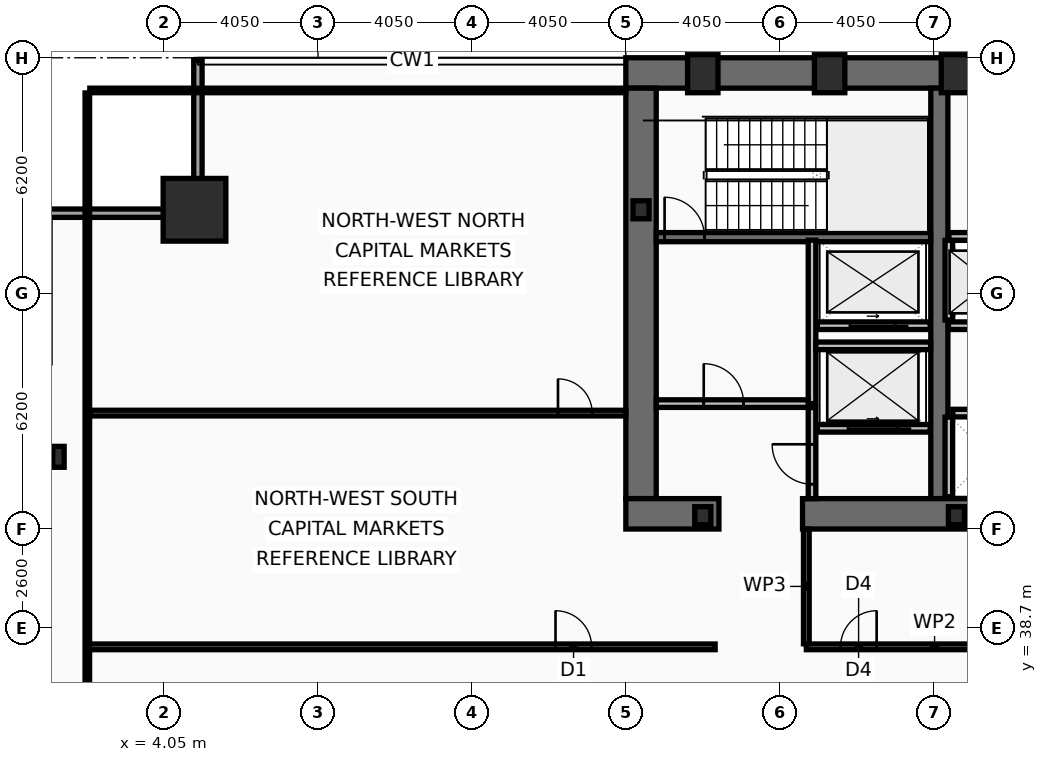
"""IFC4 building model, lengths in metres.
Left out: names, types, materials, properties, quantities, classifications, styles, units other than length and angle.
Written with IfcOpenShell. Run it as: python <this file> out.ifc"""

import sys

from ifc_helpers import new_model, si_unit, direction, frame, frame_2d, origin, origin_2d, place, context, subcontext, project, spatial, rectangle, hollow_rectangle, i_section, extrude, element, fill, save


model = new_model("IFC4")
c1 = context("Model", 3, precision=1e-05, world=origin(), true_north=direction((0.0, 1.0)))
c2 = subcontext(c1, "Body", "Model", "MODEL_VIEW")
j1 = project(units=[si_unit("LENGTHUNIT", "METRE"), si_unit("PLANEANGLEUNIT", "RADIAN")], contexts=[c1])
p1 = place(None, origin())
s1 = spatial("IfcSite", under=j1, at=p1, CompositionType="ELEMENT")
p2 = place(p1, origin())
s2 = spatial("IfcBuilding", under=s1, at=p2, CompositionType="ELEMENT")
p3 = place(p2, frame((0.0, 0.0, 57.8)))
s3 = spatial("IfcBuildingStorey", under=s2, at=p3, CompositionType="ELEMENT", Elevation=57.8)
p4 = place(p3, frame((16.2, 53.3, 0.0), z_axis=(0.0, 0.0, 1.0), x_axis=(1.0, 0.0, 0.0)))
e1 = element("IfcWall", 1, at=p4, inside=s3, PredefinedType="SHEAR", context=c2, shape_type="SweptSolid", body=[
    extrude(rectangle(XDim=40.5, YDim=0.8, at=frame_2d((20.25, 0.0))), origin(), (0.0, 0.0, 1.0), 3.82),
])
p5 = place(p3, frame((16.6, 42.1, 0.0), z_axis=(0.0, 0.0, 1.0), x_axis=(0.0, 1.0, 0.0)))
e2 = element("IfcWall", 2, at=p5, inside=s3, PredefinedType="SHEAR", context=c2, shape_type="SweptSolid", body=[
    extrude(rectangle(XDim=10.8, YDim=0.8, at=frame_2d((5.4, 0.0))), origin(), (0.0, 0.0, 1.0), 3.82),
])
p6 = place(p3, frame((24.45, 42.1, 0.0), z_axis=(0.0, 0.0, 1.0), x_axis=(0.0, 1.0, 0.0)))
e3 = element("IfcWall", 3, at=p6, inside=s3, PredefinedType="SHEAR", context=c2, shape_type="SweptSolid", body=[
    extrude(rectangle(XDim=10.8, YDim=0.45, at=frame_2d((5.4, 0.0))), origin(), (0.0, 0.0, 1.0), 3.82),
])
p7 = place(p3, frame((18.65, 41.7, 0.0), z_axis=(0.0, 0.0, 1.0), x_axis=(-1.0, 0.0, 0.0)))
e4 = element("IfcWall", 4, at=p7, inside=s3, PredefinedType="SHEAR", context=c2, shape_type="SweptSolid", body=[
    extrude(rectangle(XDim=2.45, YDim=0.8, at=frame_2d((1.225, 0.0))), origin(), (0.0, 0.0, 1.0), 3.82),
])
p8 = place(p3, frame((32.3, 41.7, 0.0), z_axis=(0.0, 0.0, 1.0), x_axis=(-1.0, 0.0, 0.0)))
e5 = element("IfcWall", 5, at=p8, inside=s3, PredefinedType="SHEAR", context=c2, shape_type="SweptSolid", body=[
    extrude(rectangle(XDim=11.45, YDim=0.8, at=frame_2d((5.725, 0.0))), origin(), (0.0, 0.0, 1.0), 3.82),
])
p9 = place(p3, frame((17.0, 48.98, 0.0), z_axis=(0.0, 0.0, 1.0), x_axis=(1.0, 0.0, 0.0)))
e6 = element("IfcWall", 6, at=p9, inside=s3, PredefinedType="SHEAR", context=c2, shape_type="SweptSolid", body=[
    extrude(rectangle(XDim=7.22, YDim=0.24, at=frame_2d((3.61, 0.0))), origin(), (0.0, 0.0, 1.0), 3.82),
])
p10 = place(p9, frame((0.22, 0.0, 0.0)))
e7 = element("IfcOpeningElement", 7, at=p10, cuts=e6, PredefinedType="OPENING", context=c2, shape_type="SweptSolid", body=[
    extrude(rectangle(XDim=1.05, YDim=2.15, at=frame_2d((0.525, 1.075))), frame((0.0, 0.13, 0.0), z_axis=(0.0, -1.0, 0.0), x_axis=(1.0, 0.0, 0.0)), (0.0, 0.0, 1.0), 0.26),
])
p11 = place(p3, frame((4.85, 49.7, 0.0), z_axis=(0.0, 0.0, 1.0), x_axis=(1.0, 0.0, 0.0)))
e8 = element("IfcColumn", 8, at=p11, inside=s3, PredefinedType="COLUMN", context=c2, shape_type="SweptSolid", body=[
    extrude(hollow_rectangle(XDim=1.65, YDim=1.65, WallThickness=0.075, at=origin_2d()), origin(), (0.0, 0.0, 1.0), 4.0),
])
for number, where, z_axis, x_axis in (
    (9, (18.225, 53.28, 0.0), (0.0, 0.0, 1.0), (1.0, 0.0, 0.0)),
    (10, (21.562, 53.28, 0.0), (0.0, 0.0, 1.0), (1.0, 0.0, 0.0)),
    (11, (24.9, 53.28, 0.0), (0.0, 0.0, 1.0), (1.0, 0.0, 0.0)),
):
    element("IfcColumn", number, at=place(p3, frame(where, z_axis=z_axis, x_axis=x_axis)), inside=s3, PredefinedType="COLUMN", context=c2, shape_type="SweptSolid", body=[
        extrude(hollow_rectangle(XDim=0.8, YDim=1.0, WallThickness=0.055, at=origin_2d()), origin(), (0.0, 0.0, 1.0), 4.0),
    ])
p12 = place(p3, frame((1.27, 43.2, 0.0), z_axis=(0.0, 0.0, 1.0), x_axis=(1.0, 0.0, 0.0)))
e12 = element("IfcColumn", 12, at=p12, inside=s3, PredefinedType="COLUMN", context=c2, shape_type="SweptSolid", body=[
    extrude(i_section(OverallWidth=0.3, OverallDepth=0.55, WebThickness=0.015, FlangeThickness=0.029, at=origin_2d()), origin(), (0.0, 0.0, 1.0), 4.0),
])
for number, where, z_axis, x_axis in (
    (13, (16.6, 49.7, 0.0), (0.0, 0.0, 1.0), (1.0, 0.0, 0.0)),
    (14, (18.225, 41.65, 0.0), (0.0, 0.0, 1.0), (1.0, 0.0, 0.0)),
    (15, (24.9, 41.65, 0.0), (0.0, 0.0, 1.0), (1.0, 0.0, 0.0)),
):
    element("IfcColumn", number, at=place(p3, frame(where, z_axis=z_axis, x_axis=x_axis)), inside=s3, PredefinedType="COLUMN", context=c2, shape_type="SweptSolid", body=[
        extrude(i_section(OverallWidth=0.424, OverallDepth=0.474, WebThickness=0.048, FlangeThickness=0.077, at=origin_2d()), origin(), (0.0, 0.0, 1.0), 4.0),
    ])
p13 = place(p3, frame((0.83, 49.61, 0.0), z_axis=(0.0, 0.0, 1.0), x_axis=(1.0, 0.0, 0.0)))
e16 = element("IfcWall", 16, at=p13, inside=s3, PredefinedType="SOLIDWALL", context=c2, shape_type="SweptSolid", body=[
    extrude(rectangle(XDim=4.22, YDim=0.22, at=frame_2d((2.11, 0.0))), origin(), (0.0, 0.0, 1.0), 3.16),
])
p14 = place(p3, frame((4.94, 49.72, 0.0), z_axis=(0.0, 0.0, 1.0), x_axis=(0.0, 1.0, 0.0)))
e17 = element("IfcWall", 17, at=p14, inside=s3, PredefinedType="SOLIDWALL", context=c2, shape_type="SweptSolid", body=[
    extrude(rectangle(XDim=3.91, YDim=0.22, at=frame_2d((1.955, 0.0))), origin(), (0.0, 0.0, 1.0), 3.16),
])
p15 = place(p3, frame((24.21, 43.95, 0.0), z_axis=(0.0, 0.0, 1.0), x_axis=(-1.0, 0.0, 0.0)))
e18 = element("IfcWall", 18, at=p15, inside=s3, PredefinedType="PARTITIONING", context=c2, shape_type="SweptSolid", body=[
    extrude(rectangle(XDim=2.97, YDim=0.2, at=frame_2d((1.485, 0.0))), origin(), (0.0, 0.0, 1.0), 3.82),
])
p16 = place(p15, frame((0.86, 0.0, 0.0)))
e19 = element("IfcOpeningElement", 19, at=p16, cuts=e18, PredefinedType="OPENING", context=c2, shape_type="SweptSolid", body=[
    extrude(rectangle(XDim=1.3, YDim=2.18, at=frame_2d((0.65, 1.09))), frame((0.0, 0.11, 0.0), z_axis=(0.0, -1.0, 0.0), x_axis=(1.0, 0.0, 0.0)), (0.0, 0.0, 1.0), 0.22),
])
p17 = place(p3, frame((24.21, 46.65, 0.0), z_axis=(0.0, 0.0, 1.0), x_axis=(-1.0, 0.0, 0.0)))
e20 = element("IfcWall", 20, at=p17, inside=s3, PredefinedType="PARTITIONING", context=c2, shape_type="SweptSolid", body=[
    extrude(rectangle(XDim=2.97, YDim=0.2, at=frame_2d((1.485, 0.0))), origin(), (0.0, 0.0, 1.0), 3.82),
])
p18 = place(p17, frame((0.91, 0.0, 0.0)))
e21 = element("IfcOpeningElement", 21, at=p18, cuts=e20, PredefinedType="OPENING", context=c2, shape_type="SweptSolid", body=[
    extrude(rectangle(XDim=1.2, YDim=2.18, at=frame_2d((0.6, 1.09))), frame((0.0, 0.11, 0.0), z_axis=(0.0, -1.0, 0.0), x_axis=(1.0, 0.0, 0.0)), (0.0, 0.0, 1.0), 0.22),
])
p19 = place(p3, frame((31.22, 46.65, 0.0), z_axis=(0.0, 0.0, 1.0), x_axis=(-1.0, 0.0, 0.0)))
e22 = element("IfcWall", 22, at=p19, inside=s3, PredefinedType="PARTITIONING", context=c2, shape_type="SweptSolid", body=[
    extrude(rectangle(XDim=6.53, YDim=0.2, at=frame_2d((3.265, 0.0))), origin(), (0.0, 0.0, 1.0), 3.82),
])
p20 = place(p19, frame((4.9, 0.0, 0.0)))
e23 = element("IfcOpeningElement", 23, at=p20, cuts=e22, PredefinedType="OPENING", context=c2, shape_type="SweptSolid", body=[
    extrude(rectangle(XDim=1.1, YDim=2.18, at=frame_2d((0.55, 1.09))), frame((0.0, 0.11, 0.0), z_axis=(0.0, -1.0, 0.0), x_axis=(1.0, 0.0, 0.0)), (0.0, 0.0, 1.0), 0.22),
])
p21 = place(p19, frame((2.74, 0.0, 0.0)))
e24 = element("IfcOpeningElement", 24, at=p21, cuts=e22, PredefinedType="OPENING", context=c2, shape_type="SweptSolid", body=[
    extrude(rectangle(XDim=1.1, YDim=2.18, at=frame_2d((0.55, 1.09))), frame((0.0, 0.11, 0.0), z_axis=(0.0, -1.0, 0.0), x_axis=(1.0, 0.0, 0.0)), (0.0, 0.0, 1.0), 0.22),
])
p22 = place(p19, frame((0.58, 0.0, 0.0)))
e25 = element("IfcOpeningElement", 25, at=p22, cuts=e22, PredefinedType="OPENING", context=c2, shape_type="SweptSolid", body=[
    extrude(rectangle(XDim=1.1, YDim=2.18, at=frame_2d((0.55, 1.09))), frame((0.0, 0.11, 0.0), z_axis=(0.0, -1.0, 0.0), x_axis=(1.0, 0.0, 0.0)), (0.0, 0.0, 1.0), 0.22),
])
p23 = place(p3, frame((21.1, 44.6, 0.0), z_axis=(0.0, 0.0, 1.0), x_axis=(0.0, 1.0, 0.0)))
e26 = element("IfcWall", 26, at=p23, inside=s3, PredefinedType="PARTITIONING", context=c2, shape_type="SweptSolid", body=[
    extrude(rectangle(XDim=4.3, YDim=0.2, at=frame_2d((2.15, 0.0))), origin(), (0.0, 0.0, 1.0), 3.82),
])
p24 = place(p3, frame((17.0, 44.6, 0.0), z_axis=(0.0, 0.0, 1.0), x_axis=(1.0, 0.0, 0.0)))
e27 = element("IfcWall", 27, at=p24, inside=s3, PredefinedType="PARTITIONING", context=c2, shape_type="SweptSolid", body=[
    extrude(rectangle(XDim=4.0, YDim=0.2, at=frame_2d((2.0, 0.0))), origin(), (0.0, 0.0, 1.0), 3.82),
])
p25 = place(p24, frame((1.25, 0.0, 0.0)))
e28 = element("IfcOpeningElement", 28, at=p25, cuts=e27, PredefinedType="OPENING", context=c2, shape_type="SweptSolid", body=[
    extrude(rectangle(XDim=1.05, YDim=2.15, at=frame_2d((0.525, 1.075))), frame((0.0, 0.11, 0.0), z_axis=(0.0, -1.0, 0.0), x_axis=(1.0, 0.0, 0.0)), (0.0, 0.0, 1.0), 0.22),
])
p26 = place(p3, frame((21.2, 46.12, 0.0), z_axis=(0.0, 0.0, 1.0), x_axis=(1.0, 0.0, 0.0)))
e29 = element("IfcWall", 29, at=p26, inside=s3, PredefinedType="PARTITIONING", context=c2, shape_type="SweptSolid", body=[
    extrude(rectangle(XDim=3.02, YDim=0.2, at=frame_2d((1.51, 0.0))), origin(), (0.0, 0.0, 1.0), 3.82),
])
p27 = place(p3, frame((21.1, 42.1, 0.0), z_axis=(0.0, 0.0, 1.0), x_axis=(0.0, 1.0, 0.0)))
e30 = element("IfcWall", 30, at=p27, inside=s3, PredefinedType="PARTITIONING", context=c2, shape_type="SweptSolid", body=[
    extrude(rectangle(XDim=2.395, YDim=0.2, at=frame_2d((1.198, 0.0))), origin(), (0.0, 0.0, 1.0), 3.82),
])
p28 = place(p27, frame((0.38, 0.0, 0.0)))
e31 = element("IfcOpeningElement", 31, at=p28, cuts=e30, PredefinedType="OPENING", context=c2, shape_type="SweptSolid", body=[
    extrude(rectangle(XDim=1.05, YDim=2.15, at=frame_2d((0.525, 1.075))), frame((0.0, 0.11, 0.0), z_axis=(0.0, -1.0, 0.0), x_axis=(1.0, 0.0, 0.0)), (0.0, 0.0, 1.0), 0.22),
])
p29 = place(p3, frame((24.7, 46.8, 0.0), z_axis=(0.0, 0.0, 1.0), x_axis=(0.0, 1.0, 0.0)))
e32 = element("IfcWall", 32, at=p29, inside=s3, PredefinedType="PARTITIONING", context=c2, shape_type="SweptSolid", body=[
    extrude(rectangle(XDim=2.095, YDim=0.2, at=frame_2d((1.047, 0.0))), origin(), (0.0, 0.0, 1.0), 3.82),
])
p30 = place(p3, frame((24.805, 44.35, 0.0), z_axis=(0.0, 0.0, 1.0), x_axis=(1.0, 0.0, 0.0)))
e33 = element("IfcWall", 33, at=p30, inside=s3, PredefinedType="PARTITIONING", context=c2, shape_type="SweptSolid", body=[
    extrude(rectangle(XDim=6.27, YDim=0.2, at=frame_2d((3.135, 0.0))), origin(), (0.0, 0.0, 1.0), 3.82),
])
p31 = place(p3, frame((24.7, 42.15, 0.0), z_axis=(0.0, 0.0, 1.0), x_axis=(0.0, 1.0, 0.0)))
e34 = element("IfcWall", 34, at=p31, inside=s3, PredefinedType="PARTITIONING", context=c2, shape_type="SweptSolid", body=[
    extrude(rectangle(XDim=2.095, YDim=0.2, at=frame_2d((1.048, 0.0))), origin(), (0.0, 0.0, 1.0), 3.82),
])
p32 = place(p3, frame((24.7, 52.86, 0.0), z_axis=(0.0, 0.0, 1.0), x_axis=(1.0, 0.0, 0.0)))
e35 = element("IfcWall", 35, at=p32, inside=s3, PredefinedType="PARTITIONING", context=c2, shape_type="SweptSolid", body=[
    extrude(rectangle(XDim=7.72, YDim=0.12, at=frame_2d((3.86, 0.0))), origin(), (0.0, 0.0, 1.0), 3.82),
])
p33 = place(p3, frame((24.7, 49.0, 0.0), z_axis=(0.0, 0.0, 1.0), x_axis=(1.0, 0.0, 0.0)))
e36 = element("IfcWall", 36, at=p33, inside=s3, PredefinedType="PARTITIONING", context=c2, shape_type="SweptSolid", body=[
    extrude(rectangle(XDim=7.72, YDim=0.2, at=frame_2d((3.86, 0.0))), origin(), (0.0, 0.0, 1.0), 3.82),
])
p34 = place(p33, frame((6.56, 0.0, 0.0)))
e37 = element("IfcOpeningElement", 37, at=p34, cuts=e36, PredefinedType="OPENING", context=c2, shape_type="SweptSolid", body=[
    extrude(rectangle(XDim=0.95, YDim=2.1, at=frame_2d((0.475, 1.05))), frame((0.0, 0.11, 0.0), z_axis=(0.0, -1.0, 0.0), x_axis=(1.0, 0.0, 0.0)), (0.0, 0.0, 1.0), 0.22),
])
p35 = place(p3, frame((20.95, 38.2, 0.0), z_axis=(0.0, 0.0, 1.0), x_axis=(1.0, 0.0, 0.0)))
e38 = element("IfcWall", 38, at=p35, inside=s3, PredefinedType="PARTITIONING", context=c2, shape_type="SweptSolid", body=[
    extrude(rectangle(XDim=4.55, YDim=0.15, at=frame_2d((2.275, 0.0))), origin(), (0.0, 0.0, 1.0), 3.01),
])
p36 = place(p35, frame((0.9, 0.0, 0.0)))
e39 = element("IfcOpeningElement", 39, at=p36, cuts=e38, PredefinedType="OPENING", context=c2, shape_type="SweptSolid", body=[
    extrude(rectangle(XDim=0.95, YDim=2.05, at=frame_2d((0.475, 1.025))), frame((0.0, 0.085, 0.0), z_axis=(0.0, -1.0, 0.0), x_axis=(1.0, 0.0, 0.0)), (0.0, 0.0, 1.0), 0.17),
])
p37 = place(p3, frame((20.95, 38.28, 0.0), z_axis=(0.0, 0.0, 1.0), x_axis=(0.0, 1.0, 0.0)))
e40 = element("IfcWall", 40, at=p37, inside=s3, PredefinedType="PARTITIONING", context=c2, shape_type="SweptSolid", body=[
    extrude(rectangle(XDim=3.02, YDim=0.15, at=frame_2d((1.51, 0.0))), origin(), (0.0, 0.0, 1.0), 3.82),
])
p38 = place(p3, frame((2.03, 38.2, 0.0), z_axis=(0.0, 0.0, 1.0), x_axis=(1.0, 0.0, 0.0)))
e41 = element("IfcWall", 41, at=p38, inside=s3, PredefinedType="PARTITIONING", context=c2, shape_type="SweptSolid", body=[
    extrude(rectangle(XDim=16.52, YDim=0.15, at=frame_2d((8.26, 0.0))), origin(), (0.0, 0.0, 1.0), 3.01),
])
p39 = place(p38, frame((12.32, 0.0, 0.0)))
e42 = element("IfcOpeningElement", 42, at=p39, cuts=e41, PredefinedType="OPENING", context=c2, shape_type="SweptSolid", body=[
    extrude(rectangle(XDim=0.95, YDim=2.05, at=frame_2d((0.475, 1.025))), frame((0.0, 0.085, 0.0), z_axis=(0.0, -1.0, 0.0), x_axis=(1.0, 0.0, 0.0)), (0.0, 0.0, 1.0), 0.17),
])
p40 = place(p3, frame((2.095, 44.35, 0.0), z_axis=(0.0, 0.0, 1.0), x_axis=(1.0, 0.0, 0.0)))
e43 = element("IfcWall", 43, at=p40, inside=s3, PredefinedType="PARTITIONING", context=c2, shape_type="SweptSolid", body=[
    extrude(rectangle(XDim=14.105, YDim=0.15, at=frame_2d((7.052, 0.0))), origin(), (0.0, 0.0, 1.0), 3.16),
])
p41 = place(p40, frame((12.32, 0.0, 0.0)))
e44 = element("IfcOpeningElement", 44, at=p41, cuts=e43, PredefinedType="OPENING", context=c2, shape_type="SweptSolid", body=[
    extrude(rectangle(XDim=0.9, YDim=2.05, at=frame_2d((0.45, 1.025))), frame((0.0, 0.085, 0.0), z_axis=(0.0, -1.0, 0.0), x_axis=(1.0, 0.0, 0.0)), (0.0, 0.0, 1.0), 0.17),
])
p42 = place(p3, frame((2.03, 10.665, 0.0), z_axis=(0.0, 0.0, 1.0), x_axis=(0.0, 1.0, 0.0)))
e45 = element("IfcWall", 45, at=p42, inside=s3, PredefinedType="PARTITIONING", context=c2, shape_type="SweptSolid", body=[
    extrude(rectangle(XDim=42.11, YDim=0.12, at=frame_2d((21.055, 0.0))), origin(), (0.0, 0.0, 1.0), 3.01),
])
p43 = place(p3, frame((2.095, 52.84, 0.0), z_axis=(0.0, 0.0, 1.0), x_axis=(1.0, 0.0, 0.0)))
e46 = element("IfcWall", 46, at=p43, inside=s3, PredefinedType="PARTITIONING", context=c2, shape_type="SweptSolid", body=[
    extrude(rectangle(XDim=14.105, YDim=0.12, at=frame_2d((7.052, 0.0))), origin(), (0.0, 0.0, 1.0), 3.82),
])
p44 = place(p10, origin())
e47 = element("IfcDoor", 47, at=p44, inside=s3, OperationType="SINGLE_SWING_LEFT", PredefinedType="DOOR", context=c2, shape_type="SweptSolid", body=[
    extrude(rectangle(XDim=1.05, YDim=2.15, at=frame_2d((0.525, 1.075))), frame((0.0, 0.025, 0.0), z_axis=(0.0, -1.0, 0.0), x_axis=(1.0, 0.0, 0.0)), (0.0, 0.0, 1.0), 0.05),
])
fill(e7, e47)
p45 = place(p16, origin())
e48 = element("IfcDoor", 48, at=p45, inside=s3, OperationType="SLIDING_TO_LEFT", PredefinedType="DOOR", context=c2, shape_type="SweptSolid", body=[
    extrude(rectangle(XDim=1.3, YDim=2.18, at=frame_2d((0.65, 1.09))), frame((0.0, 0.025, 0.0), z_axis=(0.0, -1.0, 0.0), x_axis=(1.0, 0.0, 0.0)), (0.0, 0.0, 1.0), 0.05),
])
fill(e19, e48)
p46 = place(p18, origin())
e49 = element("IfcDoor", 49, at=p46, inside=s3, OperationType="SLIDING_TO_LEFT", PredefinedType="DOOR", context=c2, shape_type="SweptSolid", body=[
    extrude(rectangle(XDim=1.2, YDim=2.18, at=frame_2d((0.6, 1.09))), frame((0.0, 0.025, 0.0), z_axis=(0.0, -1.0, 0.0), x_axis=(1.0, 0.0, 0.0)), (0.0, 0.0, 1.0), 0.05),
])
fill(e21, e49)
p47 = place(p25, origin())
e50 = element("IfcDoor", 50, at=p47, inside=s3, OperationType="SINGLE_SWING_LEFT", PredefinedType="DOOR", context=c2, shape_type="SweptSolid", body=[
    extrude(rectangle(XDim=1.05, YDim=2.15, at=frame_2d((0.525, 1.075))), frame((0.0, 0.025, 0.0), z_axis=(0.0, -1.0, 0.0), x_axis=(1.0, 0.0, 0.0)), (0.0, 0.0, 1.0), 0.05),
])
fill(e28, e50)
p48 = place(p28, origin())
e51 = element("IfcDoor", 51, at=p48, inside=s3, OperationType="SINGLE_SWING_RIGHT", PredefinedType="DOOR", context=c2, shape_type="SweptSolid", body=[
    extrude(rectangle(XDim=1.05, YDim=2.15, at=frame_2d((0.525, 1.075))), frame((0.0, 0.025, 0.0), z_axis=(0.0, -1.0, 0.0), x_axis=(1.0, 0.0, 0.0)), (0.0, 0.0, 1.0), 0.05),
])
fill(e31, e51)
p49 = place(p36, origin())
e52 = element("IfcDoor", 52, at=p49, inside=s3, OperationType="SINGLE_SWING_RIGHT", PredefinedType="DOOR", context=c2, shape_type="SweptSolid", body=[
    extrude(rectangle(XDim=0.95, YDim=2.05, at=frame_2d((0.475, 1.025))), frame((0.0, 0.025, 0.0), z_axis=(0.0, -1.0, 0.0), x_axis=(1.0, 0.0, 0.0)), (0.0, 0.0, 1.0), 0.05),
])
fill(e39, e52)
p50 = place(p39, origin())
e53 = element("IfcDoor", 53, at=p50, inside=s3, OperationType="SINGLE_SWING_LEFT", PredefinedType="DOOR", context=c2, shape_type="SweptSolid", body=[
    extrude(rectangle(XDim=0.95, YDim=2.05, at=frame_2d((0.475, 1.025))), frame((0.0, 0.025, 0.0), z_axis=(0.0, -1.0, 0.0), x_axis=(1.0, 0.0, 0.0)), (0.0, 0.0, 1.0), 0.05),
])
fill(e42, e53)
p51 = place(p41, origin())
e54 = element("IfcDoor", 54, at=p51, inside=s3, OperationType="SINGLE_SWING_LEFT", PredefinedType="DOOR", context=c2, shape_type="SweptSolid", body=[
    extrude(rectangle(XDim=0.9, YDim=2.05, at=frame_2d((0.45, 1.025))), frame((0.0, 0.025, 0.0), z_axis=(0.0, -1.0, 0.0), x_axis=(1.0, 0.0, 0.0)), (0.0, 0.0, 1.0), 0.05),
])
fill(e44, e54)
save(model, sys.argv[1])
